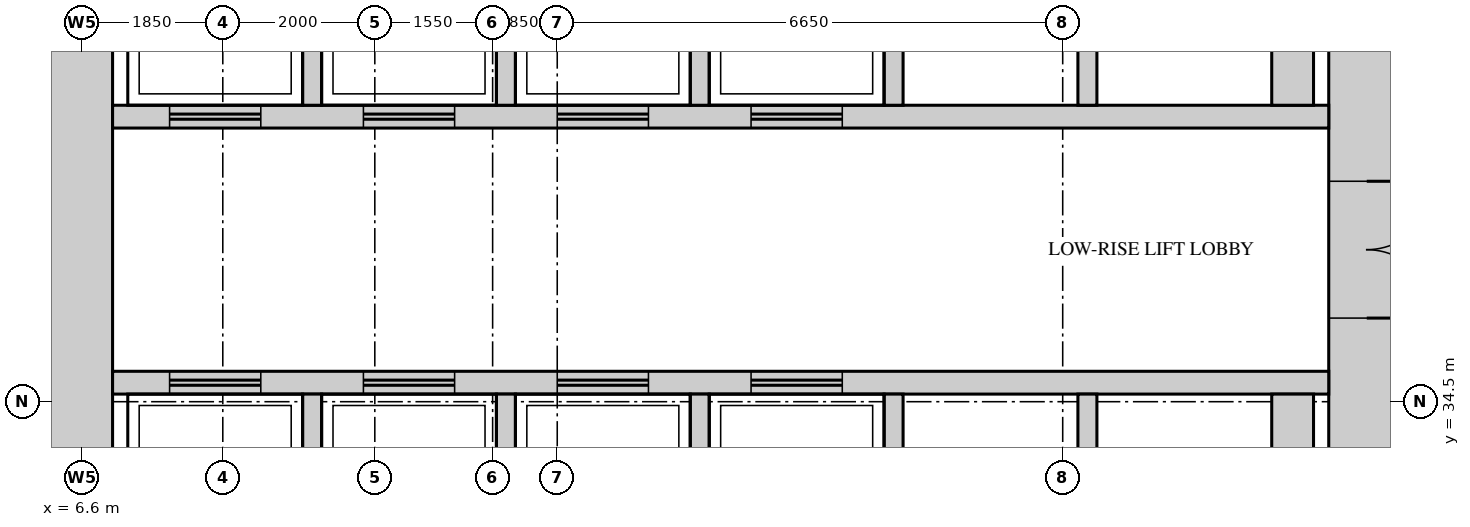
"""IFC4 building model, lengths in metres.
Left out: names, types, materials, properties, quantities, classifications, styles, units other than length and angle.
Written with IfcOpenShell. Run it as: python <this file> out.ifc"""

import sys

from ifc_helpers import new_model, si_unit, direction, frame, frame_2d, origin, place, context, subcontext, project, spatial, rectangle, extrude, source, transform, mapped, element, fill, save


model = new_model("IFC4")
c1 = context("Model", 3, precision=1e-05, world=origin(), true_north=direction((0.0, 1.0)))
c2 = subcontext(c1, "Body", "Model", "MODEL_VIEW")
j1 = project(units=[si_unit("LENGTHUNIT", "METRE"), si_unit("PLANEANGLEUNIT", "RADIAN")], contexts=[c1])
p1 = place(None, origin())
s1 = spatial("IfcSite", under=j1, at=p1, CompositionType="ELEMENT")
p2 = place(p1, origin())
s2 = spatial("IfcBuilding", under=s1, at=p2, CompositionType="ELEMENT")
p3 = place(p2, frame((0.0, 0.0, 101.5)))
s3 = spatial("IfcBuildingStorey", under=s2, at=p3, CompositionType="ELEMENT", Elevation=101.5)
m1 = source(origin(), c2, "Body", "SweptSolid", [
    extrude(rectangle(XDim=28.0, YDim=1.0, at=frame_2d((14.0, 0.0))), origin(), (0.0, 0.0, 1.0), 4.1),
])
p4 = place(p3, frame((23.5, 13.0, 0.0), z_axis=(0.0, 0.0, 1.0), x_axis=(0.0, 1.0, 0.0)))
e1 = element("IfcWall", 1, at=p4, inside=s3, PredefinedType="SHEAR", context=c2, shape_type="MappedRepresentation", body=[
    mapped(m1, transform((0.0, 0.0, 0.0))),
])
m2 = source(origin(), c2, "Body", "SweptSolid", [
    extrude(rectangle(XDim=1.8, YDim=2.1, at=frame_2d((0.9, 1.05))), frame((0.0, 0.51, 0.0), z_axis=(0.0, -1.0, 0.0), x_axis=(1.0, 0.0, 0.0)), (0.0, 0.0, 1.0), 1.02),
])
p5 = place(p4, frame((22.6, 0.0, 0.0)))
e2 = element("IfcOpeningElement", 2, at=p5, cuts=e1, PredefinedType="OPENING", context=c2, shape_type="MappedRepresentation", body=[
    mapped(m2, transform((0.0, 0.0, 0.0))),
])
m3 = source(origin(), c2, "Body", "SweptSolid", [
    extrude(rectangle(XDim=1.2, YDim=2.1, at=frame_2d((0.6, 1.05))), frame((0.0, 0.51, 0.0), z_axis=(0.0, -1.0, 0.0), x_axis=(1.0, 0.0, 0.0)), (0.0, 0.0, 1.0), 1.02),
])
p6 = place(p4, frame((13.85, 0.0, 0.0)))
e3 = element("IfcOpeningElement", 3, at=p6, cuts=e1, PredefinedType="OPENING", context=c2, shape_type="MappedRepresentation", body=[
    mapped(m3, transform((0.0, 0.0, 0.0))),
])
m4 = source(origin(), c2, "Body", "SweptSolid", [
    extrude(rectangle(XDim=0.9, YDim=2.1, at=frame_2d((0.45, 1.05))), frame((0.0, 0.51, 0.0), z_axis=(0.0, -1.0, 0.0), x_axis=(1.0, 0.0, 0.0)), (0.0, 0.0, 1.0), 1.02),
])
p7 = place(p4, frame((1.0, 0.0, 0.0)))
e4 = element("IfcOpeningElement", 4, at=p7, cuts=e1, PredefinedType="OPENING", context=c2, shape_type="MappedRepresentation", body=[
    mapped(m4, transform((0.0, 0.0, 0.0))),
])
p8 = place(p4, frame((4.0, 0.0, 0.0)))
e5 = element("IfcOpeningElement", 5, at=p8, cuts=e1, PredefinedType="OPENING", context=c2, shape_type="MappedRepresentation", body=[
    mapped(m4, transform((0.0, 0.0, 0.0))),
])
p9 = place(p4, frame((7.6, 0.0, 0.0)))
e6 = element("IfcOpeningElement", 6, at=p9, cuts=e1, PredefinedType="OPENING", context=c2, shape_type="MappedRepresentation", body=[
    mapped(m4, transform((0.0, 0.0, 0.0))),
])
p10 = place(p3, frame((6.5, 13.0, 0.0), z_axis=(0.0, 0.0, 1.0), x_axis=(0.0, 1.0, 0.0)))
e7 = element("IfcWall", 7, at=p10, inside=s3, PredefinedType="SHEAR", context=c2, shape_type="MappedRepresentation", body=[
    mapped(m1, transform((0.0, 0.0, 0.0))),
])
m5 = source(origin(), c2, "Body", "SweptSolid", [
    extrude(rectangle(XDim=16.0, YDim=0.3, at=frame_2d((8.0, 0.0))), origin(), (0.0, 0.0, 1.0), 4.1),
])
p11 = place(p3, frame((7.0, 38.25, 0.0), z_axis=(0.0, 0.0, 1.0), x_axis=(1.0, 0.0, 0.0)))
e8 = element("IfcWall", 8, at=p11, inside=s3, PredefinedType="STANDARD", context=c2, shape_type="MappedRepresentation", body=[
    mapped(m5, transform((0.0, 0.0, 0.0))),
])
m6 = source(origin(), c2, "Body", "SweptSolid", [
    extrude(rectangle(XDim=1.2, YDim=2.1, at=frame_2d((0.6, 1.05))), frame((0.0, 0.16, 0.0), z_axis=(0.0, -1.0, 0.0), x_axis=(1.0, 0.0, 0.0)), (0.0, 0.0, 1.0), 0.32),
])
p12 = place(p11, frame((0.75, 0.0, 0.0)))
e9 = element("IfcOpeningElement", 9, at=p12, cuts=e8, PredefinedType="OPENING", context=c2, shape_type="MappedRepresentation", body=[
    mapped(m6, transform((0.0, 0.0, 0.0))),
])
p13 = place(p11, frame((3.3, 0.0, 0.0)))
e10 = element("IfcOpeningElement", 10, at=p13, cuts=e8, PredefinedType="OPENING", context=c2, shape_type="MappedRepresentation", body=[
    mapped(m6, transform((0.0, 0.0, 0.0))),
])
p14 = place(p11, frame((5.85, 0.0, 0.0)))
e11 = element("IfcOpeningElement", 11, at=p14, cuts=e8, PredefinedType="OPENING", context=c2, shape_type="MappedRepresentation", body=[
    mapped(m6, transform((0.0, 0.0, 0.0))),
])
p15 = place(p11, frame((8.4, 0.0, 0.0)))
e12 = element("IfcOpeningElement", 12, at=p15, cuts=e8, PredefinedType="OPENING", context=c2, shape_type="MappedRepresentation", body=[
    mapped(m6, transform((0.0, 0.0, 0.0))),
])
p16 = place(p3, frame((7.0, 34.75, 0.0), z_axis=(0.0, 0.0, 1.0), x_axis=(1.0, 0.0, 0.0)))
e13 = element("IfcWall", 13, at=p16, inside=s3, PredefinedType="STANDARD", context=c2, shape_type="MappedRepresentation", body=[
    mapped(m5, transform((0.0, 0.0, 0.0))),
])
p17 = place(p16, frame((0.75, 0.0, 0.0)))
e14 = element("IfcOpeningElement", 14, at=p17, cuts=e13, PredefinedType="OPENING", context=c2, shape_type="MappedRepresentation", body=[
    mapped(m6, transform((0.0, 0.0, 0.0))),
])
p18 = place(p16, frame((3.3, 0.0, 0.0)))
e15 = element("IfcOpeningElement", 15, at=p18, cuts=e13, PredefinedType="OPENING", context=c2, shape_type="MappedRepresentation", body=[
    mapped(m6, transform((0.0, 0.0, 0.0))),
])
p19 = place(p16, frame((5.85, 0.0, 0.0)))
e16 = element("IfcOpeningElement", 16, at=p19, cuts=e13, PredefinedType="OPENING", context=c2, shape_type="MappedRepresentation", body=[
    mapped(m6, transform((0.0, 0.0, 0.0))),
])
p20 = place(p16, frame((8.4, 0.0, 0.0)))
e17 = element("IfcOpeningElement", 17, at=p20, cuts=e13, PredefinedType="OPENING", context=c2, shape_type="MappedRepresentation", body=[
    mapped(m6, transform((0.0, 0.0, 0.0))),
])
m7 = source(origin(), c2, "Body", "SweptSolid", [
    extrude(rectangle(XDim=2.6, YDim=0.25, at=frame_2d((1.3, 0.0))), origin(), (0.0, 0.0, 1.0), 4.1),
])
for number, where, z_axis, x_axis in (
    (18, (9.625, 38.4, 0.0), (0.0, 0.0, 1.0), (0.0, 1.0, 0.0)),
    (19, (12.175, 38.4, 0.0), (0.0, 0.0, 1.0), (0.0, 1.0, 0.0)),
    (20, (14.725, 38.4, 0.0), (0.0, 0.0, 1.0), (0.0, 1.0, 0.0)),
    (21, (17.275, 38.4, 0.0), (0.0, 0.0, 1.0), (0.0, 1.0, 0.0)),
    (22, (19.825, 38.4, 0.0), (0.0, 0.0, 1.0), (0.0, 1.0, 0.0)),
):
    element("IfcWall", number, at=place(p3, frame(where, z_axis=z_axis, x_axis=x_axis)), inside=s3, PredefinedType="STANDARD", context=c2, shape_type="MappedRepresentation", body=[
        mapped(m7, transform((0.0, 0.0, 0.0))),
    ])
m8 = source(origin(), c2, "Body", "SweptSolid", [
    extrude(rectangle(XDim=2.6, YDim=0.55, at=frame_2d((1.3, 0.0))), origin(), (0.0, 0.0, 1.0), 4.1),
])
p21 = place(p3, frame((22.525, 38.4, 0.0), z_axis=(0.0, 0.0, 1.0), x_axis=(0.0, 1.0, 0.0)))
e23 = element("IfcWall", 23, at=p21, inside=s3, PredefinedType="STANDARD", context=c2, shape_type="MappedRepresentation", body=[
    mapped(m8, transform((0.0, 0.0, 0.0))),
])
m9 = source(origin(), c2, "Body", "SweptSolid", [
    extrude(rectangle(XDim=2.4, YDim=0.25, at=frame_2d((1.2, 0.0))), origin(), (0.0, 0.0, 1.0), 4.1),
])
for number, where, z_axis, x_axis in (
    (24, (9.625, 32.2, 0.0), (0.0, 0.0, 1.0), (0.0, 1.0, 0.0)),
    (25, (12.175, 32.2, 0.0), (0.0, 0.0, 1.0), (0.0, 1.0, 0.0)),
    (26, (14.725, 32.2, 0.0), (0.0, 0.0, 1.0), (0.0, 1.0, 0.0)),
    (27, (17.275, 32.2, 0.0), (0.0, 0.0, 1.0), (0.0, 1.0, 0.0)),
    (28, (19.825, 32.2, 0.0), (0.0, 0.0, 1.0), (0.0, 1.0, 0.0)),
):
    element("IfcWall", number, at=place(p3, frame(where, z_axis=z_axis, x_axis=x_axis)), inside=s3, PredefinedType="STANDARD", context=c2, shape_type="MappedRepresentation", body=[
        mapped(m9, transform((0.0, 0.0, 0.0))),
    ])
m10 = source(origin(), c2, "Body", "SweptSolid", [
    extrude(rectangle(XDim=2.4, YDim=0.55, at=frame_2d((1.2, 0.0))), origin(), (0.0, 0.0, 1.0), 4.1),
])
p22 = place(p3, frame((22.525, 32.2, 0.0), z_axis=(0.0, 0.0, 1.0), x_axis=(0.0, 1.0, 0.0)))
e29 = element("IfcWall", 29, at=p22, inside=s3, PredefinedType="STANDARD", context=c2, shape_type="MappedRepresentation", body=[
    mapped(m10, transform((0.0, 0.0, 0.0))),
])
m11 = source(origin(), c2, "Body", "SweptSolid", [
    extrude(rectangle(XDim=1.8, YDim=2.1, at=frame_2d((0.9, 1.05))), frame((0.0, 0.45, 0.0), z_axis=(0.0, -1.0, 0.0), x_axis=(1.0, 0.0, 0.0)), (0.0, 0.0, 1.0), 0.9),
])
p23 = place(p5, origin())
e30 = element("IfcDoor", 30, at=p23, inside=s3, OperationType="DOUBLE_DOOR_SINGLE_SWING", PredefinedType="DOOR", context=c2, shape_type="MappedRepresentation", body=[
    mapped(m11, transform((0.0, 0.0, 0.0))),
])
fill(e2, e30)
m12 = source(origin(), c2, "Body", "SweptSolid", [
    extrude(rectangle(XDim=1.2, YDim=2.1, at=frame_2d((0.6, 1.05))), frame((0.0, 0.025, 0.0), z_axis=(0.0, -1.0, 0.0), x_axis=(1.0, 0.0, 0.0)), (0.0, 0.0, 1.0), 0.05),
])
p24 = place(p17, origin())
e31 = element("IfcDoor", 31, at=p24, inside=s3, OperationType="DOUBLE_DOOR_SLIDING", PredefinedType="DOOR", context=c2, shape_type="MappedRepresentation", body=[
    mapped(m12, transform((0.0, 0.0, 0.0))),
])
fill(e14, e31)
p25 = place(p18, origin())
e32 = element("IfcDoor", 32, at=p25, inside=s3, OperationType="DOUBLE_DOOR_SLIDING", PredefinedType="DOOR", context=c2, shape_type="MappedRepresentation", body=[
    mapped(m12, transform((0.0, 0.0, 0.0))),
])
fill(e15, e32)
p26 = place(p19, origin())
e33 = element("IfcDoor", 33, at=p26, inside=s3, OperationType="DOUBLE_DOOR_SLIDING", PredefinedType="DOOR", context=c2, shape_type="MappedRepresentation", body=[
    mapped(m12, transform((0.0, 0.0, 0.0))),
])
fill(e16, e33)
p27 = place(p20, origin())
e34 = element("IfcDoor", 34, at=p27, inside=s3, OperationType="DOUBLE_DOOR_SLIDING", PredefinedType="DOOR", context=c2, shape_type="MappedRepresentation", body=[
    mapped(m12, transform((0.0, 0.0, 0.0))),
])
fill(e17, e34)
p28 = place(p12, origin())
e35 = element("IfcDoor", 35, at=p28, inside=s3, OperationType="DOUBLE_DOOR_SLIDING", PredefinedType="DOOR", context=c2, shape_type="MappedRepresentation", body=[
    mapped(m12, transform((0.0, 0.0, 0.0))),
])
fill(e9, e35)
p29 = place(p13, origin())
e36 = element("IfcDoor", 36, at=p29, inside=s3, OperationType="DOUBLE_DOOR_SLIDING", PredefinedType="DOOR", context=c2, shape_type="MappedRepresentation", body=[
    mapped(m12, transform((0.0, 0.0, 0.0))),
])
fill(e10, e36)
p30 = place(p14, origin())
e37 = element("IfcDoor", 37, at=p30, inside=s3, OperationType="DOUBLE_DOOR_SLIDING", PredefinedType="DOOR", context=c2, shape_type="MappedRepresentation", body=[
    mapped(m12, transform((0.0, 0.0, 0.0))),
])
fill(e11, e37)
p31 = place(p15, origin())
e38 = element("IfcDoor", 38, at=p31, inside=s3, OperationType="DOUBLE_DOOR_SLIDING", PredefinedType="DOOR", context=c2, shape_type="MappedRepresentation", body=[
    mapped(m12, transform((0.0, 0.0, 0.0))),
])
fill(e12, e38)
save(model, sys.argv[1])
